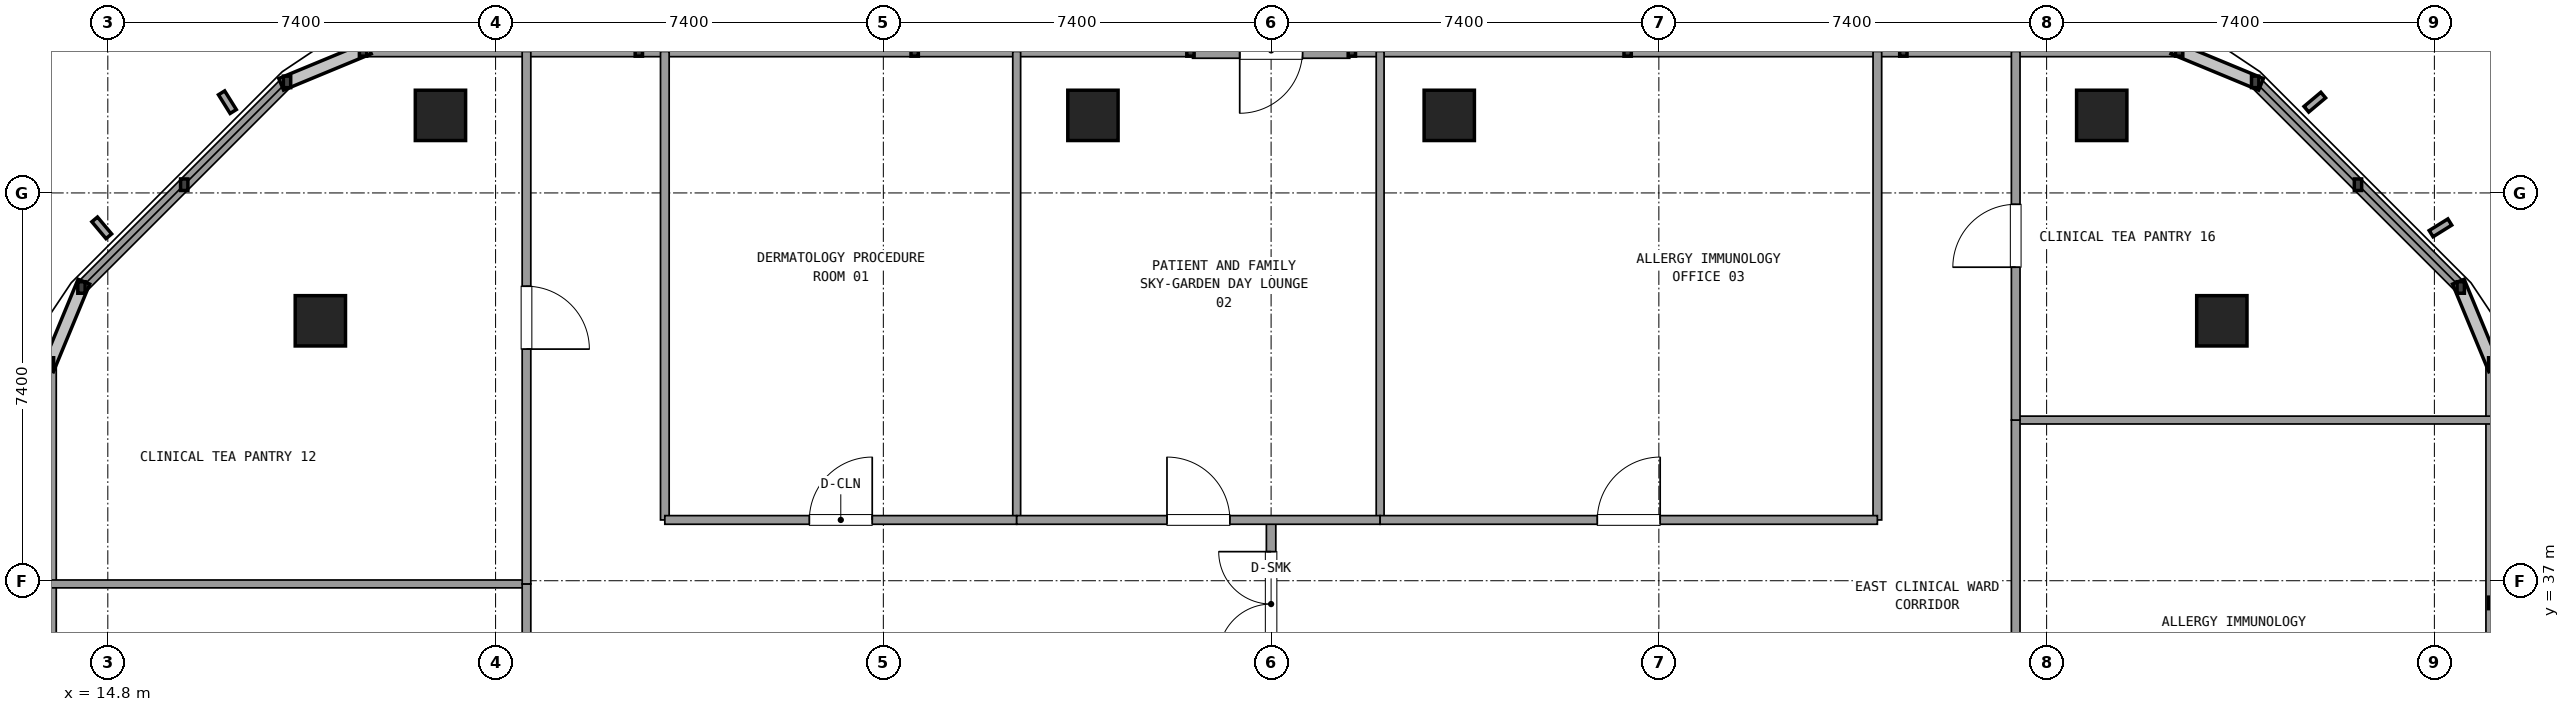
"""IFC4 building model, lengths in metres.
Left out: names, types, materials, properties, quantities, classifications, styles, units other than length and angle.
Written with IfcOpenShell. Run it as: python <this file> out.ifc"""

import sys

from ifc_helpers import new_model, si_unit, direction, frame, frame_2d, origin, origin_2d, place, context, subcontext, project, spatial, rectangle, extrude, element, fill, save


model = new_model("IFC4")
c1 = context("Model", 3, precision=1e-05, world=origin(), true_north=direction((0.0, 1.0)))
c2 = subcontext(c1, "Body", "Model", "MODEL_VIEW")
j1 = project(units=[si_unit("LENGTHUNIT", "METRE"), si_unit("PLANEANGLEUNIT", "RADIAN")], contexts=[c1])
p1 = place(None, origin())
s1 = spatial("IfcSite", under=j1, at=p1, CompositionType="ELEMENT")
p2 = place(p1, origin())
s2 = spatial("IfcBuilding", under=s1, at=p2, CompositionType="ELEMENT")
p3 = place(p2, frame((0.0, 0.0, 145.62)))
s3 = spatial("IfcBuildingStorey", under=s2, at=p3, CompositionType="ELEMENT", Elevation=145.62)
for number, where, z_axis, x_axis in (
    (1, (55.144, 41.96, 0.0), (0.0, 0.0, 1.0), (1.0, 0.0, 0.0)),
    (2, (52.852, 45.88, 0.0), (0.0, 0.0, 1.0), (1.0, 0.0, 0.0)),
    (3, (40.4, 45.88, 0.0), (0.0, 0.0, 1.0), (1.0, 0.0, 0.0)),
    (4, (33.6, 45.88, 0.0), (0.0, 0.0, 1.0), (1.0, 0.0, 0.0)),
    (5, (21.148, 45.88, 0.0), (0.0, 0.0, 1.0), (1.0, 0.0, 0.0)),
    (6, (18.856, 41.96, 0.0), (0.0, 0.0, 1.0), (1.0, 0.0, 0.0)),
):
    element("IfcColumn", number, at=place(p3, frame(where, z_axis=z_axis, x_axis=x_axis)), inside=s3, PredefinedType="COLUMN", context=c2, shape_type="SweptSolid", body=[
        extrude(rectangle(XDim=0.96, YDim=0.96, at=origin_2d()), origin(), (0.0, 0.0, 1.0), 3.6),
    ])
p4 = place(p3, frame((60.304, 27.44, 0.0), z_axis=(0.0, 0.0, 1.0), x_axis=(0.0, 1.0, 0.0)))
e7 = element("IfcWall", 7, at=p4, inside=s3, PredefinedType="SOLIDWALL", context=c2, shape_type="SweptSolid", body=[
    extrude(rectangle(XDim=13.705, YDim=0.24, at=frame_2d((6.853, 0.0))), origin(), (0.0, 0.0, 1.0), 0.85),
])
p5 = place(p3, frame((59.703, 42.596, 0.0), z_axis=(0.0, 0.0, 1.0), x_axis=(-0.707084777957, 0.707128783731, 0.0)))
e8 = element("IfcWall", 8, at=p5, inside=s3, PredefinedType="SOLIDWALL", context=c2, shape_type="SweptSolid", body=[
    extrude(rectangle(XDim=5.548, YDim=0.24, at=frame_2d((2.774, 0.0))), origin(), (0.0, 0.0, 1.0), 0.85),
])
p6 = place(p3, frame((38.501, 47.12, 0.0), z_axis=(0.0, 0.0, 1.0), x_axis=(-1.0, 0.0, 0.0)))
e9 = element("IfcWall", 9, at=p6, inside=s3, PredefinedType="SOLIDWALL", context=c2, shape_type="SweptSolid", body=[
    extrude(rectangle(XDim=3.0, YDim=0.3, at=frame_2d((1.5, 0.0))), origin(), (0.0, 0.0, 1.0), 2.67),
])
p7 = place(p6, frame((0.9, 0.0, 0.0)))
e10 = element("IfcOpeningElement", 10, at=p7, cuts=e9, PredefinedType="OPENING", context=c2, shape_type="SweptSolid", body=[
    extrude(rectangle(XDim=1.2, YDim=2.2, at=frame_2d((0.6, 1.1))), frame((0.0, 0.16, 0.0), z_axis=(0.0, -1.0, 0.0), x_axis=(1.0, 0.0, 0.0)), (0.0, 0.0, 1.0), 0.32),
])
p8 = place(p3, frame((54.329, 47.12, 0.0), z_axis=(0.0, 0.0, 1.0), x_axis=(-1.0, 0.0, 0.0)))
e11 = element("IfcWall", 11, at=p8, inside=s3, PredefinedType="SOLIDWALL", context=c2, shape_type="SweptSolid", body=[
    extrude(rectangle(XDim=15.788, YDim=0.24, at=frame_2d((7.894, 0.0))), origin(), (0.0, 0.0, 1.0), 0.85),
])
p9 = place(p3, frame((35.461, 47.12, 0.0), z_axis=(0.0, 0.0, 1.0), x_axis=(-1.0, 0.0, 0.0)))
e12 = element("IfcWall", 12, at=p9, inside=s3, PredefinedType="SOLIDWALL", context=c2, shape_type="SweptSolid", body=[
    extrude(rectangle(XDim=15.79, YDim=0.24, at=frame_2d((7.895, 0.0))), origin(), (0.0, 0.0, 1.0), 0.85),
])
p10 = place(p3, frame((18.22, 46.519, 0.0), z_axis=(0.0, 0.0, 1.0), x_axis=(-0.707084777957, -0.707128783731, 0.0)))
e13 = element("IfcWall", 13, at=p10, inside=s3, PredefinedType="SOLIDWALL", context=c2, shape_type="SweptSolid", body=[
    extrude(rectangle(XDim=5.548, YDim=0.24, at=frame_2d((2.774, 0.0))), origin(), (0.0, 0.0, 1.0), 0.85),
])
p11 = place(p3, frame((13.696, 41.145, 0.0), z_axis=(0.0, 0.0, 1.0), x_axis=(0.0, -1.0, 0.0)))
e14 = element("IfcWall", 14, at=p11, inside=s3, PredefinedType="SOLIDWALL", context=c2, shape_type="SweptSolid", body=[
    extrude(rectangle(XDim=30.49, YDim=0.24, at=frame_2d((15.245, 0.0))), origin(), (0.0, 0.0, 1.0), 0.85),
])
p12 = place(p3, frame((37.0, 34.95, 0.0), z_axis=(0.0, 0.0, 1.0), x_axis=(0.0, 1.0, 0.0)))
e15 = element("IfcWall", 15, at=p12, inside=s3, PredefinedType="PARTITIONING", context=c2, shape_type="SweptSolid", body=[
    extrude(rectangle(XDim=3.21, YDim=0.18, at=frame_2d((1.605, 0.0))), origin(), (0.0, 0.0, 1.0), 2.61),
])
p13 = place(p12, frame((0.605, 0.0, 0.0)))
e16 = element("IfcOpeningElement", 16, at=p13, cuts=e15, PredefinedType="OPENING", context=c2, shape_type="SweptSolid", body=[
    extrude(rectangle(XDim=2.0, YDim=2.2, at=frame_2d((1.0, 1.1))), frame((0.0, 0.1, 0.0), z_axis=(0.0, -1.0, 0.0), x_axis=(1.0, 0.0, 0.0)), (0.0, 0.0, 1.0), 0.2),
])
for number, where, z_axis, x_axis in (
    (17, (25.43, 38.16, 0.0), (0.0, 0.0, 1.0), (0.0, 1.0, 0.0)),
    (18, (48.57, 38.16, 0.0), (0.0, 0.0, 1.0), (0.0, 1.0, 0.0)),
):
    element("IfcWall", number, at=place(p3, frame(where, z_axis=z_axis, x_axis=x_axis)), inside=s3, PredefinedType="PARTITIONING", context=c2, shape_type="SweptSolid", body=[
        extrude(rectangle(XDim=8.94, YDim=0.165, at=frame_2d((4.47, 0.0))), origin(), (0.0, 0.0, 1.0), 2.61),
    ])
p14 = place(p3, frame((32.145, 38.16, 0.0), z_axis=(0.0, 0.0, 1.0), x_axis=(0.0, 1.0, 0.0)))
e19 = element("IfcWall", 19, at=p14, inside=s3, PredefinedType="PARTITIONING", context=c2, shape_type="SweptSolid", body=[
    extrude(rectangle(XDim=8.94, YDim=0.15, at=frame_2d((4.47, 0.0))), origin(), (0.0, 0.0, 1.0), 2.61),
])
p15 = place(p3, frame((25.43, 38.16, 0.0), z_axis=(0.0, 0.0, 1.0), x_axis=(1.0, 0.0, 0.0)))
e20 = element("IfcWall", 20, at=p15, inside=s3, PredefinedType="PARTITIONING", context=c2, shape_type="SweptSolid", body=[
    extrude(rectangle(XDim=6.715, YDim=0.165, at=frame_2d((3.357, 0.0))), origin(), (0.0, 0.0, 1.0), 2.61),
])
p16 = place(p15, frame((2.758, 0.0, 0.0)))
e21 = element("IfcOpeningElement", 21, at=p16, cuts=e20, PredefinedType="OPENING", context=c2, shape_type="SweptSolid", body=[
    extrude(rectangle(XDim=1.2, YDim=2.15, at=frame_2d((0.6, 1.075))), frame((0.0, 0.093, 0.0), z_axis=(0.0, -1.0, 0.0), x_axis=(1.0, 0.0, 0.0)), (0.0, 0.0, 1.0), 0.185),
])
p17 = place(p3, frame((39.081, 38.16, 0.0), z_axis=(0.0, 0.0, 1.0), x_axis=(0.0, 1.0, 0.0)))
e22 = element("IfcWall", 22, at=p17, inside=s3, PredefinedType="PARTITIONING", context=c2, shape_type="SweptSolid", body=[
    extrude(rectangle(XDim=8.94, YDim=0.15, at=frame_2d((4.47, 0.0))), origin(), (0.0, 0.0, 1.0), 2.61),
])
p18 = place(p3, frame((32.145, 38.16, 0.0), z_axis=(0.0, 0.0, 1.0), x_axis=(1.0, 0.0, 0.0)))
e23 = element("IfcWall", 23, at=p18, inside=s3, PredefinedType="PARTITIONING", context=c2, shape_type="SweptSolid", body=[
    extrude(rectangle(XDim=6.936, YDim=0.165, at=frame_2d((3.468, 0.0))), origin(), (0.0, 0.0, 1.0), 2.61),
])
p19 = place(p18, frame((2.868, 0.0, 0.0)))
e24 = element("IfcOpeningElement", 24, at=p19, cuts=e23, PredefinedType="OPENING", context=c2, shape_type="SweptSolid", body=[
    extrude(rectangle(XDim=1.2, YDim=2.15, at=frame_2d((0.6, 1.075))), frame((0.0, 0.093, 0.0), z_axis=(0.0, -1.0, 0.0), x_axis=(1.0, 0.0, 0.0)), (0.0, 0.0, 1.0), 0.185),
])
p20 = place(p3, frame((39.081, 38.16, 0.0), z_axis=(0.0, 0.0, 1.0), x_axis=(1.0, 0.0, 0.0)))
e25 = element("IfcWall", 25, at=p20, inside=s3, PredefinedType="PARTITIONING", context=c2, shape_type="SweptSolid", body=[
    extrude(rectangle(XDim=9.489, YDim=0.165, at=frame_2d((4.745, 0.0))), origin(), (0.0, 0.0, 1.0), 2.61),
])
p21 = place(p20, frame((4.144, 0.0, 0.0)))
e26 = element("IfcOpeningElement", 26, at=p21, cuts=e25, PredefinedType="OPENING", context=c2, shape_type="SweptSolid", body=[
    extrude(rectangle(XDim=1.2, YDim=2.15, at=frame_2d((0.6, 1.075))), frame((0.0, 0.093, 0.0), z_axis=(0.0, -1.0, 0.0), x_axis=(1.0, 0.0, 0.0)), (0.0, 0.0, 1.0), 0.185),
])
p22 = place(p3, frame((22.79, 36.939, 0.0), z_axis=(0.0, 0.0, 1.0), x_axis=(-1.0, 0.0, 0.0)))
e27 = element("IfcWall", 27, at=p22, inside=s3, PredefinedType="PARTITIONING", context=c2, shape_type="SweptSolid", body=[
    extrude(rectangle(XDim=9.074, YDim=0.15, at=frame_2d((4.537, 0.0))), origin(), (0.0, 0.0, 1.0), 2.61),
])
p23 = place(p3, frame((22.79, 27.56, 0.0), z_axis=(0.0, 0.0, 1.0), x_axis=(0.0, 1.0, 0.0)))
e28 = element("IfcWall", 28, at=p23, inside=s3, PredefinedType="PARTITIONING", context=c2, shape_type="SweptSolid", body=[
    extrude(rectangle(XDim=9.379, YDim=0.165, at=frame_2d((4.689, 0.0))), origin(), (0.0, 0.0, 1.0), 2.61),
])
p24 = place(p23, frame((4.09, 0.0, 0.0)))
e29 = element("IfcOpeningElement", 29, at=p24, cuts=e28, PredefinedType="OPENING", context=c2, shape_type="SweptSolid", body=[
    extrude(rectangle(XDim=1.2, YDim=2.15, at=frame_2d((0.6, 1.075))), frame((0.0, 0.093, 0.0), z_axis=(0.0, -1.0, 0.0), x_axis=(1.0, 0.0, 0.0)), (0.0, 0.0, 1.0), 0.185),
])
p25 = place(p3, frame((22.79, 36.939, 0.0), z_axis=(0.0, 0.0, 1.0), x_axis=(0.0, 1.0, 0.0)))
e30 = element("IfcWall", 30, at=p25, inside=s3, PredefinedType="PARTITIONING", context=c2, shape_type="SweptSolid", body=[
    extrude(rectangle(XDim=10.161, YDim=0.165, at=frame_2d((5.081, 0.0))), origin(), (0.0, 0.0, 1.0), 2.61),
])
p26 = place(p25, frame((4.481, 0.0, 0.0)))
e31 = element("IfcOpeningElement", 31, at=p26, cuts=e30, PredefinedType="OPENING", context=c2, shape_type="SweptSolid", body=[
    extrude(rectangle(XDim=1.2, YDim=2.15, at=frame_2d((0.6, 1.075))), frame((0.0, 0.093, 0.0), z_axis=(0.0, -1.0, 0.0), x_axis=(1.0, 0.0, 0.0)), (0.0, 0.0, 1.0), 0.185),
])
p27 = place(p3, frame((51.21, 40.066, 0.0), z_axis=(0.0, 0.0, 1.0), x_axis=(1.0, 0.0, 0.0)))
e32 = element("IfcWall", 32, at=p27, inside=s3, PredefinedType="PARTITIONING", context=c2, shape_type="SweptSolid", body=[
    extrude(rectangle(XDim=9.074, YDim=0.15, at=frame_2d((4.537, 0.0))), origin(), (0.0, 0.0, 1.0), 2.61),
])
p28 = place(p3, frame((51.21, 27.56, 0.0), z_axis=(0.0, 0.0, 1.0), x_axis=(0.0, 1.0, 0.0)))
e33 = element("IfcWall", 33, at=p28, inside=s3, PredefinedType="PARTITIONING", context=c2, shape_type="SweptSolid", body=[
    extrude(rectangle(XDim=12.506, YDim=0.165, at=frame_2d((6.253, 0.0))), origin(), (0.0, 0.0, 1.0), 2.61),
])
p29 = place(p28, frame((5.653, 0.0, 0.0)))
e34 = element("IfcOpeningElement", 34, at=p29, cuts=e33, PredefinedType="OPENING", context=c2, shape_type="SweptSolid", body=[
    extrude(rectangle(XDim=1.2, YDim=2.15, at=frame_2d((0.6, 1.075))), frame((0.0, 0.093, 0.0), z_axis=(0.0, -1.0, 0.0), x_axis=(1.0, 0.0, 0.0)), (0.0, 0.0, 1.0), 0.185),
])
p30 = place(p3, frame((51.21, 40.066, 0.0), z_axis=(0.0, 0.0, 1.0), x_axis=(0.0, 1.0, 0.0)))
e35 = element("IfcWall", 35, at=p30, inside=s3, PredefinedType="PARTITIONING", context=c2, shape_type="SweptSolid", body=[
    extrude(rectangle(XDim=7.034, YDim=0.165, at=frame_2d((3.517, 0.0))), origin(), (0.0, 0.0, 1.0), 2.61),
])
p31 = place(p30, frame((2.917, 0.0, 0.0)))
e36 = element("IfcOpeningElement", 36, at=p31, cuts=e35, PredefinedType="OPENING", context=c2, shape_type="SweptSolid", body=[
    extrude(rectangle(XDim=1.2, YDim=2.15, at=frame_2d((0.6, 1.075))), frame((0.0, 0.093, 0.0), z_axis=(0.0, -1.0, 0.0), x_axis=(1.0, 0.0, 0.0)), (0.0, 0.0, 1.0), 0.185),
])
p32 = place(p13, origin())
e37 = element("IfcDoor", 37, at=p32, inside=s3, OperationType="DOUBLE_DOOR_SINGLE_SWING", PredefinedType="DOOR", context=c2, shape_type="SweptSolid", body=[
    extrude(rectangle(XDim=2.0, YDim=2.2, at=frame_2d((1.0, 1.1))), frame((0.0, 0.025, 0.0), z_axis=(0.0, -1.0, 0.0), x_axis=(1.0, 0.0, 0.0)), (0.0, 0.0, 1.0), 0.05),
])
fill(e16, e37)
p33 = place(p16, origin())
e38 = element("IfcDoor", 38, at=p33, inside=s3, OperationType="SINGLE_SWING_RIGHT", PredefinedType="DOOR", context=c2, shape_type="SweptSolid", body=[
    extrude(rectangle(XDim=1.2, YDim=2.15, at=frame_2d((0.6, 1.075))), frame((0.0, 0.025, 0.0), z_axis=(0.0, -1.0, 0.0), x_axis=(1.0, 0.0, 0.0)), (0.0, 0.0, 1.0), 0.05),
])
fill(e21, e38)
p34 = place(p19, origin())
e39 = element("IfcDoor", 39, at=p34, inside=s3, OperationType="SINGLE_SWING_LEFT", PredefinedType="DOOR", context=c2, shape_type="SweptSolid", body=[
    extrude(rectangle(XDim=1.2, YDim=2.15, at=frame_2d((0.6, 1.075))), frame((0.0, 0.025, 0.0), z_axis=(0.0, -1.0, 0.0), x_axis=(1.0, 0.0, 0.0)), (0.0, 0.0, 1.0), 0.05),
])
fill(e24, e39)
p35 = place(p21, origin())
e40 = element("IfcDoor", 40, at=p35, inside=s3, OperationType="SINGLE_SWING_RIGHT", PredefinedType="DOOR", context=c2, shape_type="SweptSolid", body=[
    extrude(rectangle(XDim=1.2, YDim=2.15, at=frame_2d((0.6, 1.075))), frame((0.0, 0.025, 0.0), z_axis=(0.0, -1.0, 0.0), x_axis=(1.0, 0.0, 0.0)), (0.0, 0.0, 1.0), 0.05),
])
fill(e26, e40)
p36 = place(p26, frame((1.2, 0.0, 0.0), z_axis=(0.0, 0.0, 1.0), x_axis=(-1.0, 0.0, 0.0)))
e41 = element("IfcDoor", 41, at=p36, inside=s3, OperationType="SINGLE_SWING_LEFT", PredefinedType="DOOR", context=c2, shape_type="SweptSolid", body=[
    extrude(rectangle(XDim=1.2, YDim=2.15, at=frame_2d((0.6, 1.075))), frame((0.0, 0.025, 0.0), z_axis=(0.0, -1.0, 0.0), x_axis=(1.0, 0.0, 0.0)), (0.0, 0.0, 1.0), 0.05),
])
fill(e31, e41)
p37 = place(p31, origin())
e42 = element("IfcDoor", 42, at=p37, inside=s3, OperationType="SINGLE_SWING_LEFT", PredefinedType="DOOR", context=c2, shape_type="SweptSolid", body=[
    extrude(rectangle(XDim=1.2, YDim=2.15, at=frame_2d((0.6, 1.075))), frame((0.0, 0.025, 0.0), z_axis=(0.0, -1.0, 0.0), x_axis=(1.0, 0.0, 0.0)), (0.0, 0.0, 1.0), 0.05),
])
fill(e36, e42)
save(model, sys.argv[1])
